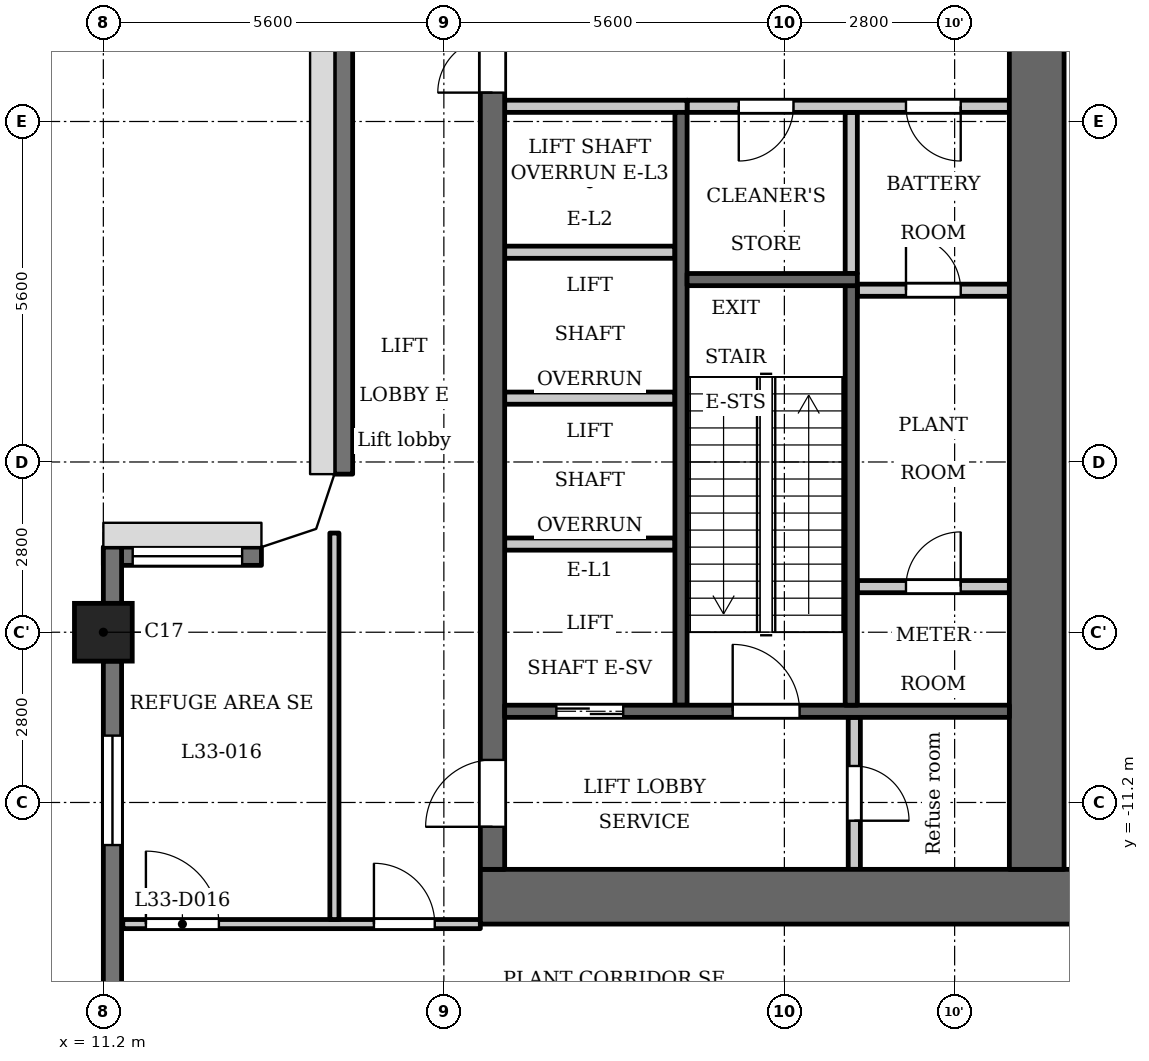
"""IFC4 building model, lengths in metres.
Left out: names, types, materials, properties, quantities, classifications, styles, units other than length and angle.
Written with IfcOpenShell. Run it as: python <this file> out.ifc"""

import sys

from ifc_helpers import new_model, si_unit, direction, frame, frame_2d, origin, origin_2d, place, context, subcontext, project, spatial, polyline, rectangle, outline, extrude, element, fill, save


model = new_model("IFC4")
c1 = context("Model", 3, precision=1e-05, world=origin(), true_north=direction((0.0, 1.0)))
c2 = subcontext(c1, "Body", "Model", "MODEL_VIEW")
j1 = project(units=[si_unit("LENGTHUNIT", "METRE"), si_unit("PLANEANGLEUNIT", "RADIAN")], contexts=[c1])
p1 = place(None, origin())
s1 = spatial("IfcSite", under=j1, at=p1, CompositionType="ELEMENT")
p2 = place(p1, origin())
s2 = spatial("IfcBuilding", under=s1, at=p2, CompositionType="ELEMENT")
p3 = place(p2, frame((0.0, 0.0, 130.7)))
s3 = spatial("IfcBuildingStorey", under=s2, at=p3, CompositionType="ELEMENT", Elevation=130.7)
p4 = place(p3, frame((11.2, -8.4, 0.0), z_axis=(0.0, 0.0, 1.0), x_axis=(1.0, 0.0, 0.0)))
e1 = element("IfcColumn", 1, at=p4, inside=s3, PredefinedType="COLUMN", context=c2, shape_type="SweptSolid", body=[
    extrude(rectangle(XDim=0.95, YDim=0.95, at=origin_2d()), origin(), (0.0, 0.0, 1.0), 5.4),
])
p5 = place(p3, frame((13.8, -7.15, 0.0), z_axis=(0.0, 0.0, 1.0), x_axis=(-1.0, 0.0, 0.0)))
e2 = element("IfcWall", 2, at=p5, inside=s3, PredefinedType="SOLIDWALL", context=c2, shape_type="SweptSolid", body=[
    extrude(rectangle(XDim=2.6, YDim=0.3, at=frame_2d((1.3, 0.0))), origin(), (0.0, 0.0, 1.0), 5.1),
])
p6 = place(p5, frame((0.317, 0.0, 0.9)))
e3 = element("IfcOpeningElement", 3, at=p6, cuts=e2, PredefinedType="OPENING", context=c2, shape_type="SweptSolid", body=[
    extrude(rectangle(XDim=1.8, YDim=1.5, at=frame_2d((0.9, 0.75))), frame((0.0, 0.16, 0.0), z_axis=(0.0, -1.0, 0.0), x_axis=(1.0, 0.0, 0.0)), (0.0, 0.0, 1.0), 0.32),
])
p7 = place(p3, frame((11.35, -7.0, 0.0), z_axis=(0.0, 0.0, 1.0), x_axis=(0.0, -1.0, 0.0)))
e4 = element("IfcWall", 4, at=p7, inside=s3, PredefinedType="SOLIDWALL", context=c2, shape_type="SweptSolid", body=[
    extrude(rectangle(XDim=0.925, YDim=0.3, at=frame_2d((0.462, 0.0))), origin(), (0.0, 0.0, 1.0), 5.1),
])
p8 = place(p3, frame((11.35, -8.875, 0.0), z_axis=(0.0, 0.0, 1.0), x_axis=(0.0, -1.0, 0.0)))
e5 = element("IfcWall", 5, at=p8, inside=s3, PredefinedType="SOLIDWALL", context=c2, shape_type="SweptSolid", body=[
    extrude(rectangle(XDim=6.1, YDim=0.3, at=frame_2d((3.05, 0.0))), origin(), (0.0, 0.0, 1.0), 5.1),
])
p9 = place(p8, frame((1.225, 0.0, 0.9)))
e6 = element("IfcOpeningElement", 6, at=p9, cuts=e5, PredefinedType="OPENING", context=c2, shape_type="SweptSolid", body=[
    extrude(rectangle(XDim=1.8, YDim=1.5, at=frame_2d((0.9, 0.75))), frame((0.0, 0.16, 0.0), z_axis=(0.0, -1.0, 0.0), x_axis=(1.0, 0.0, 0.0)), (0.0, 0.0, 1.0), 0.32),
])
p10 = place(p3, frame((15.15, 5.8, 0.0), z_axis=(0.0, 0.0, 1.0), x_axis=(0.0, -1.0, 0.0)))
e7 = element("IfcWall", 7, at=p10, inside=s3, PredefinedType="SOLIDWALL", context=c2, shape_type="SweptSolid", body=[
    extrude(rectangle(XDim=11.6, YDim=0.3, at=frame_2d((5.8, 0.0))), origin(), (0.0, 0.0, 1.0), 5.1),
])
p11 = place(p3, frame((23.5, -2.5, 0.0), z_axis=(0.0, 0.0, 1.0), x_axis=(0.0, 1.0, 0.0)))
e8 = element("IfcWall", 8, at=p11, inside=s3, PredefinedType="PARTITIONING", context=c2, shape_type="SweptSolid", body=[
    extrude(rectangle(XDim=2.65, YDim=0.2, at=frame_2d((1.325, 0.0))), origin(), (0.0, 0.0, 1.0), 5.1),
])
p12 = place(p3, frame((20.7, -9.6, 0.0), z_axis=(0.0, 0.0, 1.0), x_axis=(0.0, 1.0, 0.0)))
e9 = element("IfcWall", 9, at=p12, inside=s3, PredefinedType="SHEAR", context=c2, shape_type="SweptSolid", body=[
    extrude(rectangle(XDim=9.75, YDim=0.2, at=frame_2d((4.875, 0.0))), origin(), (0.0, 0.0, 1.0), 5.1),
])
p13 = place(p3, frame((20.8, 0.25, 0.0), z_axis=(0.0, 0.0, 1.0), x_axis=(1.0, 0.0, 0.0)))
e10 = element("IfcWall", 10, at=p13, inside=s3, PredefinedType="PARTITIONING", context=c2, shape_type="SweptSolid", body=[
    extrude(rectangle(XDim=5.3, YDim=0.2, at=frame_2d((2.65, 0.0))), origin(), (0.0, 0.0, 1.0), 5.1),
])
p14 = place(p13, frame((0.85, 0.0, 0.0)))
e11 = element("IfcOpeningElement", 11, at=p14, cuts=e10, PredefinedType="OPENING", context=c2, shape_type="SweptSolid", body=[
    extrude(rectangle(XDim=0.9, YDim=2.1, at=frame_2d((0.45, 1.05))), frame((0.0, 0.11, 0.0), z_axis=(0.0, -1.0, 0.0), x_axis=(1.0, 0.0, 0.0)), (0.0, 0.0, 1.0), 0.22),
])
p15 = place(p13, frame((3.6, 0.0, 0.0)))
e12 = element("IfcOpeningElement", 12, at=p15, cuts=e10, PredefinedType="OPENING", context=c2, shape_type="SweptSolid", body=[
    extrude(rectangle(XDim=0.9, YDim=2.1, at=frame_2d((0.45, 1.05))), frame((0.0, 0.11, 0.0), z_axis=(0.0, -1.0, 0.0), x_axis=(1.0, 0.0, 0.0)), (0.0, 0.0, 1.0), 0.22),
])
p16 = place(p3, frame((17.4, -12.75, 0.0), z_axis=(0.0, 0.0, 1.0), x_axis=(1.0, 0.0, 0.0)))
e13 = element("IfcWall", 13, at=p16, inside=s3, PredefinedType="SHEAR", context=c2, shape_type="SweptSolid", body=[
    extrude(rectangle(XDim=10.4, YDim=0.9, at=frame_2d((5.2, 0.0))), origin(), (0.0, 0.0, 1.0), 5.1),
])
p17 = place(p3, frame((17.6, -12.3, 0.0), z_axis=(0.0, 0.0, 1.0), x_axis=(0.0, 1.0, 0.0)))
e14 = element("IfcWall", 14, at=p17, inside=s3, PredefinedType="SHEAR", context=c2, shape_type="SweptSolid", body=[
    extrude(rectangle(XDim=24.6, YDim=0.4, at=frame_2d((12.3, 0.0))), origin(), (0.0, 0.0, 1.0), 5.1),
])
p18 = place(p17, frame((15.45, 0.0, 0.0)))
e15 = element("IfcOpeningElement", 15, at=p18, cuts=e14, PredefinedType="OPENING", context=c2, shape_type="SweptSolid", body=[
    extrude(rectangle(XDim=1.1, YDim=2.1, at=frame_2d((0.55, 1.05))), frame((0.0, 0.21, 0.0), z_axis=(0.0, -1.0, 0.0), x_axis=(1.0, 0.0, 0.0)), (0.0, 0.0, 1.0), 0.42),
])
p19 = place(p17, frame((17.85, 0.0, 0.0)))
e16 = element("IfcOpeningElement", 16, at=p19, cuts=e14, PredefinedType="OPENING", context=c2, shape_type="SweptSolid", body=[
    extrude(rectangle(XDim=1.1, YDim=2.1, at=frame_2d((0.55, 1.05))), frame((0.0, 0.21, 0.0), z_axis=(0.0, -1.0, 0.0), x_axis=(1.0, 0.0, 0.0)), (0.0, 0.0, 1.0), 0.42),
])
p20 = place(p17, frame((22.8, 0.0, 0.0)))
e17 = element("IfcOpeningElement", 17, at=p20, cuts=e14, PredefinedType="OPENING", context=c2, shape_type="SweptSolid", body=[
    extrude(rectangle(XDim=1.1, YDim=2.1, at=frame_2d((0.55, 1.05))), frame((0.0, 0.21, 0.0), z_axis=(0.0, -1.0, 0.0), x_axis=(1.0, 0.0, 0.0)), (0.0, 0.0, 1.0), 0.42),
])
p21 = place(p17, frame((0.7, 0.0, 0.0)))
e18 = element("IfcOpeningElement", 18, at=p21, cuts=e14, PredefinedType="OPENING", context=c2, shape_type="SweptSolid", body=[
    extrude(rectangle(XDim=1.1, YDim=2.1, at=frame_2d((0.55, 1.05))), frame((0.0, 0.21, 0.0), z_axis=(0.0, -1.0, 0.0), x_axis=(1.0, 0.0, 0.0)), (0.0, 0.0, 1.0), 0.42),
])
p22 = place(p17, frame((12.775, 0.0, 0.0)))
e19 = element("IfcOpeningElement", 19, at=p22, cuts=e14, PredefinedType="OPENING", context=c2, shape_type="SweptSolid", body=[
    extrude(rectangle(XDim=1.8, YDim=2.1, at=frame_2d((0.9, 1.05))), frame((0.0, 0.21, 0.0), z_axis=(0.0, -1.0, 0.0), x_axis=(1.0, 0.0, 0.0)), (0.0, 0.0, 1.0), 0.42),
])
p23 = place(p3, frame((26.55, -12.3, 0.0), z_axis=(0.0, 0.0, 1.0), x_axis=(0.0, 1.0, 0.0)))
e20 = element("IfcWall", 20, at=p23, inside=s3, PredefinedType="SHEAR", context=c2, shape_type="SweptSolid", body=[
    extrude(rectangle(XDim=24.6, YDim=0.9, at=frame_2d((12.3, 0.0))), origin(), (0.0, 0.0, 1.0), 5.1),
])
p24 = place(p3, frame((23.55, -12.3, 0.0), z_axis=(0.0, 0.0, 1.0), x_axis=(0.0, 1.0, 0.0)))
e21 = element("IfcWall", 21, at=p24, inside=s3, PredefinedType="PARTITIONING", context=c2, shape_type="SweptSolid", body=[
    extrude(rectangle(XDim=2.5, YDim=0.2, at=frame_2d((1.25, 0.0))), origin(), (0.0, 0.0, 1.0), 5.1),
])
p25 = place(p24, frame((0.8, 0.0, 0.0)))
e22 = element("IfcOpeningElement", 22, at=p25, cuts=e21, PredefinedType="OPENING", context=c2, shape_type="SweptSolid", body=[
    extrude(rectangle(XDim=0.9, YDim=2.1, at=frame_2d((0.45, 1.05))), frame((0.0, 0.11, 0.0), z_axis=(0.0, -1.0, 0.0), x_axis=(1.0, 0.0, 0.0)), (0.0, 0.0, 1.0), 0.22),
])
p26 = place(p3, frame((23.6, -7.65, 0.0), z_axis=(0.0, 0.0, 1.0), x_axis=(1.0, 0.0, 0.0)))
e23 = element("IfcWall", 23, at=p26, inside=s3, PredefinedType="PARTITIONING", context=c2, shape_type="SweptSolid", body=[
    extrude(rectangle(XDim=2.5, YDim=0.2, at=frame_2d((1.25, 0.0))), origin(), (0.0, 0.0, 1.0), 5.1),
])
p27 = place(p26, frame((0.8, 0.0, 0.0)))
e24 = element("IfcOpeningElement", 24, at=p27, cuts=e23, PredefinedType="OPENING", context=c2, shape_type="SweptSolid", body=[
    extrude(rectangle(XDim=0.9, YDim=2.1, at=frame_2d((0.45, 1.05))), frame((0.0, 0.11, 0.0), z_axis=(0.0, -1.0, 0.0), x_axis=(1.0, 0.0, 0.0)), (0.0, 0.0, 1.0), 0.22),
])
p28 = place(p3, frame((23.6, -2.775, 0.0), z_axis=(0.0, 0.0, 1.0), x_axis=(1.0, 0.0, 0.0)))
e25 = element("IfcWall", 25, at=p28, inside=s3, PredefinedType="PARTITIONING", context=c2, shape_type="SweptSolid", body=[
    extrude(rectangle(XDim=2.5, YDim=0.2, at=frame_2d((1.25, 0.0))), origin(), (0.0, 0.0, 1.0), 5.1),
])
p29 = place(p28, frame((0.8, 0.0, 0.0)))
e26 = element("IfcOpeningElement", 26, at=p29, cuts=e25, PredefinedType="OPENING", context=c2, shape_type="SweptSolid", body=[
    extrude(rectangle(XDim=0.9, YDim=2.1, at=frame_2d((0.45, 1.05))), frame((0.0, 0.11, 0.0), z_axis=(0.0, -1.0, 0.0), x_axis=(1.0, 0.0, 0.0)), (0.0, 0.0, 1.0), 0.22),
])
p30 = place(p3, frame((17.8, -9.7, 0.0), z_axis=(0.0, 0.0, 1.0), x_axis=(1.0, 0.0, 0.0)))
e27 = element("IfcWall", 27, at=p30, inside=s3, PredefinedType="SHEAR", context=c2, shape_type="SweptSolid", body=[
    extrude(rectangle(XDim=8.3, YDim=0.2, at=frame_2d((4.15, 0.0))), origin(), (0.0, 0.0, 1.0), 5.1),
])
p31 = place(p30, frame((0.85, 0.0, 0.0)))
e28 = element("IfcOpeningElement", 28, at=p31, cuts=e27, PredefinedType="OPENING", context=c2, shape_type="SweptSolid", body=[
    extrude(rectangle(XDim=1.1, YDim=2.1, at=frame_2d((0.55, 1.05))), frame((0.0, 0.11, 0.0), z_axis=(0.0, -1.0, 0.0), x_axis=(1.0, 0.0, 0.0)), (0.0, 0.0, 1.0), 0.22),
])
p32 = place(p30, frame((3.75, 0.0, 0.0)))
e29 = element("IfcOpeningElement", 29, at=p32, cuts=e27, PredefinedType="OPENING", context=c2, shape_type="SweptSolid", body=[
    extrude(rectangle(XDim=1.1, YDim=2.1, at=frame_2d((0.55, 1.05))), frame((0.0, 0.11, 0.0), z_axis=(0.0, -1.0, 0.0), x_axis=(1.0, 0.0, 0.0)), (0.0, 0.0, 1.0), 0.22),
])
for number, where, z_axis, x_axis in (
    (30, (17.8, -6.95, 0.0), (0.0, 0.0, 1.0), (1.0, 0.0, 0.0)),
    (31, (17.8, -4.55, 0.0), (0.0, 0.0, 1.0), (1.0, 0.0, 0.0)),
    (32, (17.8, -2.15, 0.0), (0.0, 0.0, 1.0), (1.0, 0.0, 0.0)),
):
    element("IfcWall", number, at=place(p3, frame(where, z_axis=z_axis, x_axis=x_axis)), inside=s3, PredefinedType="PARTITIONING", context=c2, shape_type="SweptSolid", body=[
        extrude(rectangle(XDim=2.8, YDim=0.2, at=frame_2d((1.4, 0.0))), origin(), (0.0, 0.0, 1.0), 5.1),
    ])
p33 = place(p3, frame((17.8, 0.25, 0.0), z_axis=(0.0, 0.0, 1.0), x_axis=(1.0, 0.0, 0.0)))
e33 = element("IfcWall", 33, at=p33, inside=s3, PredefinedType="PARTITIONING", context=c2, shape_type="SweptSolid", body=[
    extrude(rectangle(XDim=3.0, YDim=0.2, at=frame_2d((1.5, 0.0))), origin(), (0.0, 0.0, 1.0), 5.1),
])
p34 = place(p3, frame((23.5, -9.6, 0.0), z_axis=(0.0, 0.0, 1.0), x_axis=(0.0, 1.0, 0.0)))
e34 = element("IfcWall", 34, at=p34, inside=s3, PredefinedType="SHEAR", context=c2, shape_type="SweptSolid", body=[
    extrude(rectangle(XDim=6.9, YDim=0.2, at=frame_2d((3.45, 0.0))), origin(), (0.0, 0.0, 1.0), 5.1),
])
p35 = place(p3, frame((20.8, -2.6, 0.0), z_axis=(0.0, 0.0, 1.0), x_axis=(1.0, 0.0, 0.0)))
e35 = element("IfcWall", 35, at=p35, inside=s3, PredefinedType="SHEAR", context=c2, shape_type="SweptSolid", body=[
    extrude(rectangle(XDim=2.8, YDim=0.2, at=frame_2d((1.4, 0.0))), origin(), (0.0, 0.0, 1.0), 5.1),
])
p36 = place(p3, frame((11.52, -13.2, 0.0), z_axis=(0.0, 0.0, 1.0), x_axis=(1.0, 0.0, 0.0)))
e36 = element("IfcWall", 36, at=p36, inside=s3, PredefinedType="PARTITIONING", context=c2, shape_type="SweptSolid", body=[
    extrude(rectangle(XDim=5.88, YDim=0.15, at=frame_2d((2.94, 0.0))), origin(), (0.0, 0.0, 1.0), 5.1),
])
p37 = place(p36, frame((4.13, 0.0, 0.0)))
e37 = element("IfcOpeningElement", 37, at=p37, cuts=e36, PredefinedType="OPENING", context=c2, shape_type="SweptSolid", body=[
    extrude(rectangle(XDim=1.0, YDim=2.1, at=frame_2d((0.5, 1.05))), frame((0.0, 0.085, 0.0), z_axis=(0.0, -1.0, 0.0), x_axis=(1.0, 0.0, 0.0)), (0.0, 0.0, 1.0), 0.17),
])
p38 = place(p36, frame((0.38, 0.0, 0.0)))
e38 = element("IfcOpeningElement", 38, at=p38, cuts=e36, PredefinedType="OPENING", context=c2, shape_type="SweptSolid", body=[
    extrude(rectangle(XDim=1.2, YDim=2.1, at=frame_2d((0.6, 1.05))), frame((0.0, 0.085, 0.0), z_axis=(0.0, -1.0, 0.0), x_axis=(1.0, 0.0, 0.0)), (0.0, 0.0, 1.0), 0.17),
])
p39 = place(p3, frame((15.0, -13.125, 0.0), z_axis=(0.0, 0.0, 1.0), x_axis=(0.0, 1.0, 0.0)))
e39 = element("IfcWall", 39, at=p39, inside=s3, PredefinedType="PARTITIONING", context=c2, shape_type="SweptSolid", body=[
    extrude(rectangle(XDim=6.356, YDim=0.15, at=frame_2d((3.178, 0.0))), origin(), (0.0, 0.0, 1.0), 5.1),
])
p40 = place(p3, origin())
e40 = element("IfcWall", 40, at=p40, inside=s3, PredefinedType="SOLIDWALL", context=c2, shape_type="SweptSolid", body=[
    extrude(outline(polyline([(15.0, -5.8), (14.7, -6.7), (13.8, -7.0), (13.8, -7.3), (13.849, -7.3), (14.937, -6.937), (15.3, -5.849), (15.3, -5.8), (15.0, -5.8)])), origin(), (0.0, 0.0, 1.0), 5.1),
])
p41 = place(p31, origin())
e41 = element("IfcDoor", 41, at=p41, inside=s3, OperationType="DOUBLE_DOOR_SLIDING", PredefinedType="DOOR", context=c2, shape_type="SweptSolid", body=[
    extrude(rectangle(XDim=1.1, YDim=2.1, at=frame_2d((0.55, 1.05))), frame((0.0, 0.025, 0.0), z_axis=(0.0, -1.0, 0.0), x_axis=(1.0, 0.0, 0.0)), (0.0, 0.0, 1.0), 0.05),
])
fill(e28, e41)
p42 = place(p21, origin())
e42 = element("IfcDoor", 42, at=p42, inside=s3, OperationType="SINGLE_SWING_RIGHT", PredefinedType="DOOR", context=c2, shape_type="SweptSolid", body=[
    extrude(rectangle(XDim=1.1, YDim=2.1, at=frame_2d((0.55, 1.05))), frame((0.0, 0.025, 0.0), z_axis=(0.0, -1.0, 0.0), x_axis=(1.0, 0.0, 0.0)), (0.0, 0.0, 1.0), 0.05),
])
fill(e18, e42)
p43 = place(p25, origin())
e43 = element("IfcDoor", 43, at=p43, inside=s3, OperationType="SINGLE_SWING_LEFT", PredefinedType="DOOR", context=c2, shape_type="SweptSolid", body=[
    extrude(rectangle(XDim=0.9, YDim=2.1, at=frame_2d((0.45, 1.05))), frame((0.0, 0.025, 0.0), z_axis=(0.0, -1.0, 0.0), x_axis=(1.0, 0.0, 0.0)), (0.0, 0.0, 1.0), 0.05),
])
fill(e22, e43)
p44 = place(p32, origin())
e44 = element("IfcDoor", 44, at=p44, inside=s3, OperationType="SINGLE_SWING_RIGHT", PredefinedType="DOOR", context=c2, shape_type="SweptSolid", body=[
    extrude(rectangle(XDim=1.1, YDim=2.1, at=frame_2d((0.55, 1.05))), frame((0.0, 0.025, 0.0), z_axis=(0.0, -1.0, 0.0), x_axis=(1.0, 0.0, 0.0)), (0.0, 0.0, 1.0), 0.05),
])
fill(e29, e44)
p45 = place(p22, origin())
e45 = element("IfcDoor", 45, at=p45, inside=s3, OperationType="DOUBLE_DOOR_SINGLE_SWING", PredefinedType="DOOR", context=c2, shape_type="SweptSolid", body=[
    extrude(rectangle(XDim=1.8, YDim=2.1, at=frame_2d((0.9, 1.05))), frame((0.0, 0.025, 0.0), z_axis=(0.0, -1.0, 0.0), x_axis=(1.0, 0.0, 0.0)), (0.0, 0.0, 1.0), 0.05),
])
fill(e19, e45)
p46 = place(p14, origin())
e46 = element("IfcDoor", 46, at=p46, inside=s3, OperationType="SINGLE_SWING_LEFT", PredefinedType="DOOR", context=c2, shape_type="SweptSolid", body=[
    extrude(rectangle(XDim=0.9, YDim=2.1, at=frame_2d((0.45, 1.05))), frame((0.0, 0.025, 0.0), z_axis=(0.0, -1.0, 0.0), x_axis=(1.0, 0.0, 0.0)), (0.0, 0.0, 1.0), 0.05),
])
fill(e11, e46)
p47 = place(p27, origin())
e47 = element("IfcDoor", 47, at=p47, inside=s3, OperationType="SINGLE_SWING_LEFT", PredefinedType="DOOR", context=c2, shape_type="SweptSolid", body=[
    extrude(rectangle(XDim=0.9, YDim=2.1, at=frame_2d((0.45, 1.05))), frame((0.0, 0.025, 0.0), z_axis=(0.0, -1.0, 0.0), x_axis=(1.0, 0.0, 0.0)), (0.0, 0.0, 1.0), 0.05),
])
fill(e24, e47)
p48 = place(p29, origin())
e48 = element("IfcDoor", 48, at=p48, inside=s3, OperationType="SINGLE_SWING_RIGHT", PredefinedType="DOOR", context=c2, shape_type="SweptSolid", body=[
    extrude(rectangle(XDim=0.9, YDim=2.1, at=frame_2d((0.45, 1.05))), frame((0.0, 0.025, 0.0), z_axis=(0.0, -1.0, 0.0), x_axis=(1.0, 0.0, 0.0)), (0.0, 0.0, 1.0), 0.05),
])
fill(e26, e48)
p49 = place(p15, origin())
e49 = element("IfcDoor", 49, at=p49, inside=s3, OperationType="SINGLE_SWING_RIGHT", PredefinedType="DOOR", context=c2, shape_type="SweptSolid", body=[
    extrude(rectangle(XDim=0.9, YDim=2.1, at=frame_2d((0.45, 1.05))), frame((0.0, 0.025, 0.0), z_axis=(0.0, -1.0, 0.0), x_axis=(1.0, 0.0, 0.0)), (0.0, 0.0, 1.0), 0.05),
])
fill(e12, e49)
p50 = place(p37, origin())
e50 = element("IfcDoor", 50, at=p50, inside=s3, OperationType="SINGLE_SWING_RIGHT", PredefinedType="DOOR", context=c2, shape_type="SweptSolid", body=[
    extrude(rectangle(XDim=1.0, YDim=2.1, at=frame_2d((0.5, 1.05))), frame((0.0, 0.025, 0.0), z_axis=(0.0, -1.0, 0.0), x_axis=(1.0, 0.0, 0.0)), (0.0, 0.0, 1.0), 0.05),
])
fill(e37, e50)
p51 = place(p38, origin())
e51 = element("IfcDoor", 51, at=p51, inside=s3, OperationType="SINGLE_SWING_RIGHT", PredefinedType="DOOR", context=c2, shape_type="SweptSolid", body=[
    extrude(rectangle(XDim=1.2, YDim=2.1, at=frame_2d((0.6, 1.05))), frame((0.0, 0.025, 0.0), z_axis=(0.0, -1.0, 0.0), x_axis=(1.0, 0.0, 0.0)), (0.0, 0.0, 1.0), 0.05),
])
fill(e38, e51)
p52 = place(p6, origin())
e52 = element("IfcWindow", 52, at=p52, inside=s3, PartitioningType="SINGLE_PANEL", PredefinedType="WINDOW", context=c2, shape_type="SweptSolid", body=[
    extrude(rectangle(XDim=1.8, YDim=1.5, at=frame_2d((0.9, 0.75))), frame((0.0, 0.03, 0.0), z_axis=(0.0, -1.0, 0.0), x_axis=(1.0, 0.0, 0.0)), (0.0, 0.0, 1.0), 0.06),
])
fill(e3, e52)
p53 = place(p9, origin())
e53 = element("IfcWindow", 53, at=p53, inside=s3, PartitioningType="SINGLE_PANEL", PredefinedType="WINDOW", context=c2, shape_type="SweptSolid", body=[
    extrude(rectangle(XDim=1.8, YDim=1.5, at=frame_2d((0.9, 0.75))), frame((0.0, 0.03, 0.0), z_axis=(0.0, -1.0, 0.0), x_axis=(1.0, 0.0, 0.0)), (0.0, 0.0, 1.0), 0.06),
])
fill(e6, e53)
save(model, sys.argv[1])
